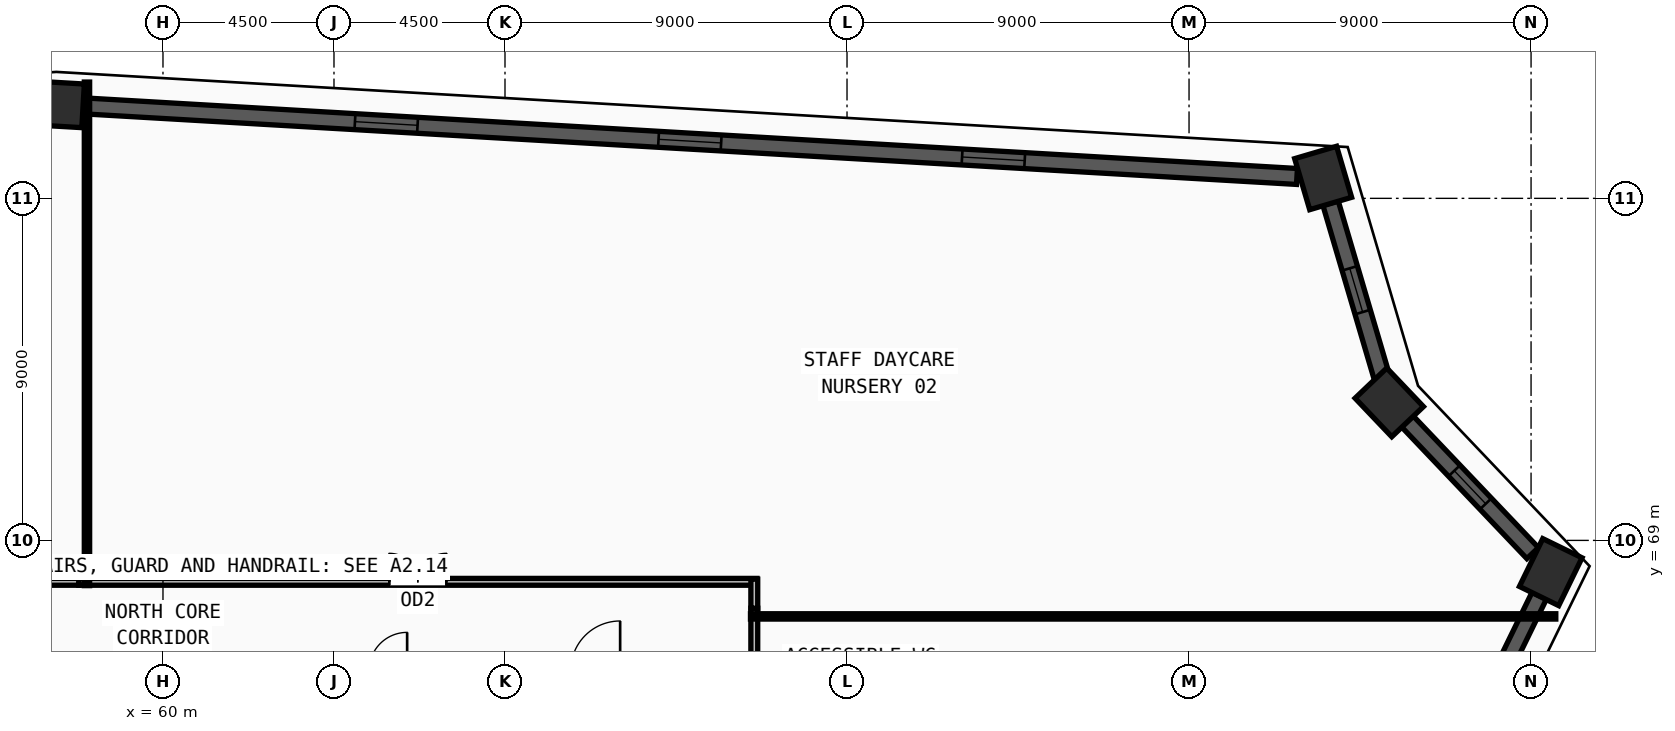
"""IFC4 building model, lengths in metres.
Left out: names, types, materials, properties, quantities, classifications, styles, units other than length and angle.
Written with IfcOpenShell. Run it as: python <this file> out.ifc"""

import sys

from ifc_helpers import new_model, si_unit, direction, frame, frame_2d, origin, origin_2d, place, context, subcontext, project, spatial, rectangle, extrude, source, transform, mapped, element, fill, save


model = new_model("IFC4")
c1 = context("Model", 3, precision=1e-05, world=origin(), true_north=direction((0.0, 1.0)))
c2 = subcontext(c1, "Body", "Model", "MODEL_VIEW")
j1 = project(units=[si_unit("LENGTHUNIT", "METRE"), si_unit("PLANEANGLEUNIT", "RADIAN")], contexts=[c1])
p1 = place(None, origin())
s1 = spatial("IfcSite", under=j1, at=p1, CompositionType="ELEMENT")
p2 = place(p1, origin())
s2 = spatial("IfcBuilding", under=s1, at=p2, CompositionType="ELEMENT")
p3 = place(p2, frame((0.0, 0.0, 113.25)))
s3 = spatial("IfcBuildingStorey", under=s2, at=p3, CompositionType="ELEMENT", Elevation=113.25)
m1 = source(origin(), c2, "Body", "SweptSolid", [
    extrude(rectangle(XDim=1.4, YDim=1.15, at=origin_2d()), origin(), (0.0, 0.0, 1.0), 3.75),
])
for number, where, z_axis, x_axis in (
    (1, (57.199, 80.475, 0.0), (0.0, 0.0, 1.0), (-0.998, 0.058, 0.0)),
    (2, (90.529, 78.536, 0.0), (0.0, 0.0, 1.0), (-0.283, 0.959, 0.0)),
    (3, (92.269, 72.631, 0.0), (0.0, 0.0, 1.0), (-0.689, 0.724, 0.0)),
    (4, (96.518, 68.165, 0.0), (0.0, 0.0, 1.0), (0.439, 0.899, 0.0)),
):
    element("IfcColumn", number, at=place(p3, frame(where, z_axis=z_axis, x_axis=x_axis)), inside=s3, PredefinedType="COLUMN", context=c2, shape_type="MappedRepresentation", body=[
        mapped(m1, transform((0.0, 0.0, 0.0), x_axis=(1.0, 0.0, 0.0), y_axis=(0.0, 1.0, 0.0), z_axis=(0.0, 0.0, 1.0), scale=1.0)),
    ])
p4 = place(p3, frame((84.632, 43.808, 0.0), z_axis=(0.0, 0.0, 1.0), x_axis=(0.43854819507, 0.898707672495, 0.0)))
e5 = element("IfcWall", 5, at=p4, inside=s3, PredefinedType="SOLIDWALL", context=c2, shape_type="SweptSolid", body=[
    extrude(rectangle(XDim=26.412, YDim=0.42, at=frame_2d((13.206, 0.0))), origin(), (0.0, 0.0, 1.0), 3.57),
])
m2 = source(origin(), c2, "Body", "SweptSolid", [
    extrude(rectangle(XDim=1.65, YDim=1.95, at=frame_2d((0.825, 0.975))), frame((0.0, 0.22, 0.0), z_axis=(0.0, -1.0, 0.0), x_axis=(1.0, 0.0, 0.0)), (0.0, 0.0, 1.0), 0.44),
])
p5 = place(p4, frame((4.928, 0.0, 0.55)))
e6 = element("IfcOpeningElement", 6, at=p5, cuts=e5, PredefinedType="OPENING", context=c2, shape_type="MappedRepresentation", body=[
    mapped(m2, transform((0.0, 0.0, 0.0), x_axis=(1.0, 0.0, 0.0), y_axis=(0.0, 1.0, 0.0), z_axis=(0.0, 0.0, 1.0), scale=1.0)),
])
p6 = place(p4, frame((18.984, 0.0, 0.55)))
e7 = element("IfcOpeningElement", 7, at=p6, cuts=e5, PredefinedType="OPENING", context=c2, shape_type="MappedRepresentation", body=[
    mapped(m2, transform((0.0, 0.0, 0.0), x_axis=(1.0, 0.0, 0.0), y_axis=(0.0, 1.0, 0.0), z_axis=(0.0, 0.0, 1.0), scale=1.0)),
])
p7 = place(p3, frame((96.042, 68.665, 0.0), z_axis=(0.0, 0.0, 1.0), x_axis=(-0.689201349378, 0.724569872417, 0.0)))
e8 = element("IfcWall", 8, at=p7, inside=s3, PredefinedType="SOLIDWALL", context=c2, shape_type="SweptSolid", body=[
    extrude(rectangle(XDim=4.784, YDim=0.42, at=frame_2d((2.392, 0.0))), origin(), (0.0, 0.0, 1.0), 3.57),
])
m3 = source(origin(), c2, "Body", "SweptSolid", [
    extrude(rectangle(XDim=1.2, YDim=1.9, at=frame_2d((0.6, 0.95))), frame((0.0, 0.22, 0.0), z_axis=(0.0, -1.0, 0.0), x_axis=(1.0, 0.0, 0.0)), (0.0, 0.0, 1.0), 0.44),
])
p8 = place(p7, frame((1.792, 0.0, 0.55)))
e9 = element("IfcOpeningElement", 9, at=p8, cuts=e8, PredefinedType="OPENING", context=c2, shape_type="MappedRepresentation", body=[
    mapped(m3, transform((0.0, 0.0, 0.0), x_axis=(1.0, 0.0, 0.0), y_axis=(0.0, 1.0, 0.0), z_axis=(0.0, 0.0, 1.0), scale=1.0)),
])
p9 = place(p3, frame((92.074, 73.293, 0.0), z_axis=(0.0, 0.0, 1.0), x_axis=(-0.282645095573, 0.959224556581, 0.0)))
e10 = element("IfcWall", 10, at=p9, inside=s3, PredefinedType="SOLIDWALL", context=c2, shape_type="SweptSolid", body=[
    extrude(rectangle(XDim=4.776, YDim=0.42, at=frame_2d((2.388, 0.0))), origin(), (0.0, 0.0, 1.0), 3.57),
])
p10 = place(p9, frame((1.788, 0.0, 0.55)))
e11 = element("IfcOpeningElement", 11, at=p10, cuts=e10, PredefinedType="OPENING", context=c2, shape_type="MappedRepresentation", body=[
    mapped(m3, transform((0.0, 0.0, 0.0), x_axis=(1.0, 0.0, 0.0), y_axis=(0.0, 1.0, 0.0), z_axis=(0.0, 0.0, 1.0), scale=1.0)),
])
p11 = place(p3, frame((89.84, 78.576, 0.0), z_axis=(0.0, 0.0, 1.0), x_axis=(-0.99831154776, 0.05808660439, 0.0)))
e12 = element("IfcWall", 12, at=p11, inside=s3, PredefinedType="SOLIDWALL", context=c2, shape_type="SweptSolid", body=[
    extrude(rectangle(XDim=32.006, YDim=0.42, at=frame_2d((16.003, 0.0))), origin(), (0.0, 0.0, 1.0), 3.57),
])
p12 = place(p11, frame((7.177, 0.0, 0.55)))
e13 = element("IfcOpeningElement", 13, at=p12, cuts=e12, PredefinedType="OPENING", context=c2, shape_type="MappedRepresentation", body=[
    mapped(m2, transform((0.0, 0.0, 0.0), x_axis=(1.0, 0.0, 0.0), y_axis=(0.0, 1.0, 0.0), z_axis=(0.0, 0.0, 1.0), scale=1.0)),
])
p13 = place(p11, frame((15.178, 0.0, 0.55)))
e14 = element("IfcOpeningElement", 14, at=p13, cuts=e12, PredefinedType="OPENING", context=c2, shape_type="MappedRepresentation", body=[
    mapped(m2, transform((0.0, 0.0, 0.0), x_axis=(1.0, 0.0, 0.0), y_axis=(0.0, 1.0, 0.0), z_axis=(0.0, 0.0, 1.0), scale=1.0)),
])
p14 = place(p11, frame((23.18, 0.0, 0.55)))
e15 = element("IfcOpeningElement", 15, at=p14, cuts=e12, PredefinedType="OPENING", context=c2, shape_type="MappedRepresentation", body=[
    mapped(m2, transform((0.0, 0.0, 0.0), x_axis=(1.0, 0.0, 0.0), y_axis=(0.0, 1.0, 0.0), z_axis=(0.0, 0.0, 1.0), scale=1.0)),
])
p15 = place(p3, frame((57.785, 67.91, 0.0), z_axis=(0.0, 0.0, 1.0), x_axis=(1.0, 0.0, 0.0)))
e16 = element("IfcWall", 16, at=p15, inside=s3, PredefinedType="PARTITIONING", context=c2, shape_type="SweptSolid", body=[
    extrude(rectangle(XDim=17.845, YDim=0.18, at=frame_2d((8.922, 0.0))), origin(), (0.0, 0.0, 1.0), 3.57),
])
m4 = source(origin(), c2, "Body", "SweptSolid", [
    extrude(rectangle(XDim=1.5, YDim=2.2, at=frame_2d((0.75, 1.1))), frame((0.0, 0.1, 0.0), z_axis=(0.0, -1.0, 0.0), x_axis=(1.0, 0.0, 0.0)), (0.0, 0.0, 1.0), 0.2),
])
p16 = place(p15, frame((8.172, 0.0, 0.0)))
e17 = element("IfcOpeningElement", 17, at=p16, cuts=e16, PredefinedType="OPENING", context=c2, shape_type="MappedRepresentation", body=[
    mapped(m4, transform((0.0, 0.0, 0.0), x_axis=(1.0, 0.0, 0.0), y_axis=(0.0, 1.0, 0.0), z_axis=(0.0, 0.0, 1.0), scale=1.0)),
])
p17 = place(p3, frame((44.37, 67.91, 0.0), z_axis=(0.0, 0.0, 1.0), x_axis=(1.0, 0.0, 0.0)))
e18 = element("IfcWall", 18, at=p17, inside=s3, PredefinedType="PARTITIONING", context=c2, shape_type="SweptSolid", body=[
    extrude(rectangle(XDim=13.415, YDim=0.18, at=frame_2d((6.708, 0.0))), origin(), (0.0, 0.0, 1.0), 3.57),
])
p18 = place(p17, frame((5.957, 0.0, 0.0)))
e19 = element("IfcOpeningElement", 19, at=p18, cuts=e18, PredefinedType="OPENING", context=c2, shape_type="MappedRepresentation", body=[
    mapped(m4, transform((0.0, 0.0, 0.0), x_axis=(1.0, 0.0, 0.0), y_axis=(0.0, 1.0, 0.0), z_axis=(0.0, 0.0, 1.0), scale=1.0)),
])
p19 = place(p3, frame((75.56, 67.215, 0.0), z_axis=(0.0, 0.0, 1.0), x_axis=(0.0, -1.0, 0.0)))
e20 = element("IfcWall", 20, at=p19, inside=s3, PredefinedType="PARTITIONING", context=c2, shape_type="SweptSolid", body=[
    extrude(rectangle(XDim=2.035, YDim=0.18, at=frame_2d((1.018, 0.0))), origin(), (0.0, 0.0, 1.0), 3.57),
])
p20 = place(p3, frame((75.56, 67.98, 0.0), z_axis=(0.0, 0.0, 1.0), x_axis=(0.0, -1.0, 0.0)))
e21 = element("IfcWall", 21, at=p20, inside=s3, PredefinedType="PARTITIONING", context=c2, shape_type="SweptSolid", body=[
    extrude(rectangle(XDim=0.765, YDim=0.18, at=frame_2d((0.382, 0.0))), origin(), (0.0, 0.0, 1.0), 3.57),
])
p21 = place(p3, frame((75.46, 67.0, 0.0), z_axis=(0.0, 0.0, 1.0), x_axis=(1.0, 0.0, 0.0)))
e22 = element("IfcWall", 22, at=p21, inside=s3, PredefinedType="PARTITIONING", context=c2, shape_type="SweptSolid", body=[
    extrude(rectangle(XDim=21.191, YDim=0.14, at=frame_2d((10.595, 0.0))), origin(), (0.0, 0.0, 1.0), 2.755),
])
p22 = place(p3, frame((58.0, 67.81, 0.0), z_axis=(0.0, 0.0, 1.0), x_axis=(0.0, 1.0, 0.0)))
e23 = element("IfcWall", 23, at=p22, inside=s3, PredefinedType="PARTITIONING", context=c2, shape_type="SweptSolid", body=[
    extrude(rectangle(XDim=13.25, YDim=0.14, at=frame_2d((6.625, 0.0))), origin(), (0.0, 0.0, 1.0), 3.57),
])
m5 = source(origin(), c2, "Body", "SweptSolid", [
    extrude(rectangle(XDim=1.2, YDim=1.9, at=frame_2d((0.6, 0.95))), frame((0.0, 0.03, 0.0), z_axis=(0.0, -1.0, 0.0), x_axis=(1.0, 0.0, 0.0)), (0.0, 0.0, 1.0), 0.06),
])
p23 = place(p8, origin())
e24 = element("IfcWindow", 24, at=p23, inside=s3, PartitioningType="SINGLE_PANEL", PredefinedType="WINDOW", context=c2, shape_type="MappedRepresentation", body=[
    mapped(m5, transform((0.0, 0.0, 0.0), x_axis=(1.0, 0.0, 0.0), y_axis=(0.0, 1.0, 0.0), z_axis=(0.0, 0.0, 1.0), scale=1.0)),
])
fill(e9, e24)
p24 = place(p10, origin())
e25 = element("IfcWindow", 25, at=p24, inside=s3, PartitioningType="SINGLE_PANEL", PredefinedType="WINDOW", context=c2, shape_type="MappedRepresentation", body=[
    mapped(m5, transform((0.0, 0.0, 0.0), x_axis=(1.0, 0.0, 0.0), y_axis=(0.0, 1.0, 0.0), z_axis=(0.0, 0.0, 1.0), scale=1.0)),
])
fill(e11, e25)
m6 = source(origin(), c2, "Body", "SweptSolid", [
    extrude(rectangle(XDim=1.65, YDim=1.95, at=frame_2d((0.825, 0.975))), frame((0.0, 0.03, 0.0), z_axis=(0.0, -1.0, 0.0), x_axis=(1.0, 0.0, 0.0)), (0.0, 0.0, 1.0), 0.06),
])
p25 = place(p12, origin())
e26 = element("IfcWindow", 26, at=p25, inside=s3, PartitioningType="DOUBLE_PANEL_VERTICAL", PredefinedType="WINDOW", context=c2, shape_type="MappedRepresentation", body=[
    mapped(m6, transform((0.0, 0.0, 0.0), x_axis=(1.0, 0.0, 0.0), y_axis=(0.0, 1.0, 0.0), z_axis=(0.0, 0.0, 1.0), scale=1.0)),
])
fill(e13, e26)
p26 = place(p13, origin())
e27 = element("IfcWindow", 27, at=p26, inside=s3, PartitioningType="DOUBLE_PANEL_VERTICAL", PredefinedType="WINDOW", context=c2, shape_type="MappedRepresentation", body=[
    mapped(m6, transform((0.0, 0.0, 0.0), x_axis=(1.0, 0.0, 0.0), y_axis=(0.0, 1.0, 0.0), z_axis=(0.0, 0.0, 1.0), scale=1.0)),
])
fill(e14, e27)
p27 = place(p14, origin())
e28 = element("IfcWindow", 28, at=p27, inside=s3, PartitioningType="DOUBLE_PANEL_VERTICAL", PredefinedType="WINDOW", context=c2, shape_type="MappedRepresentation", body=[
    mapped(m6, transform((0.0, 0.0, 0.0), x_axis=(1.0, 0.0, 0.0), y_axis=(0.0, 1.0, 0.0), z_axis=(0.0, 0.0, 1.0), scale=1.0)),
])
fill(e15, e28)
m7 = source(origin(), c2, "Body", "SweptSolid", [
    extrude(rectangle(XDim=1.5, YDim=2.2, at=frame_2d((0.75, 1.1))), frame((0.0, 0.025, 0.0), z_axis=(0.0, -1.0, 0.0), x_axis=(1.0, 0.0, 0.0)), (0.0, 0.0, 1.0), 0.05),
])
p28 = place(p16, origin())
e29 = element("IfcDoor", 29, at=p28, inside=s3, OperationType="DOUBLE_DOOR_SINGLE_SWING", PredefinedType="DOOR", context=c2, shape_type="MappedRepresentation", body=[
    mapped(m7, transform((0.0, 0.0, 0.0), x_axis=(1.0, 0.0, 0.0), y_axis=(0.0, 1.0, 0.0), z_axis=(0.0, 0.0, 1.0), scale=1.0)),
])
fill(e17, e29)
save(model, sys.argv[1])
